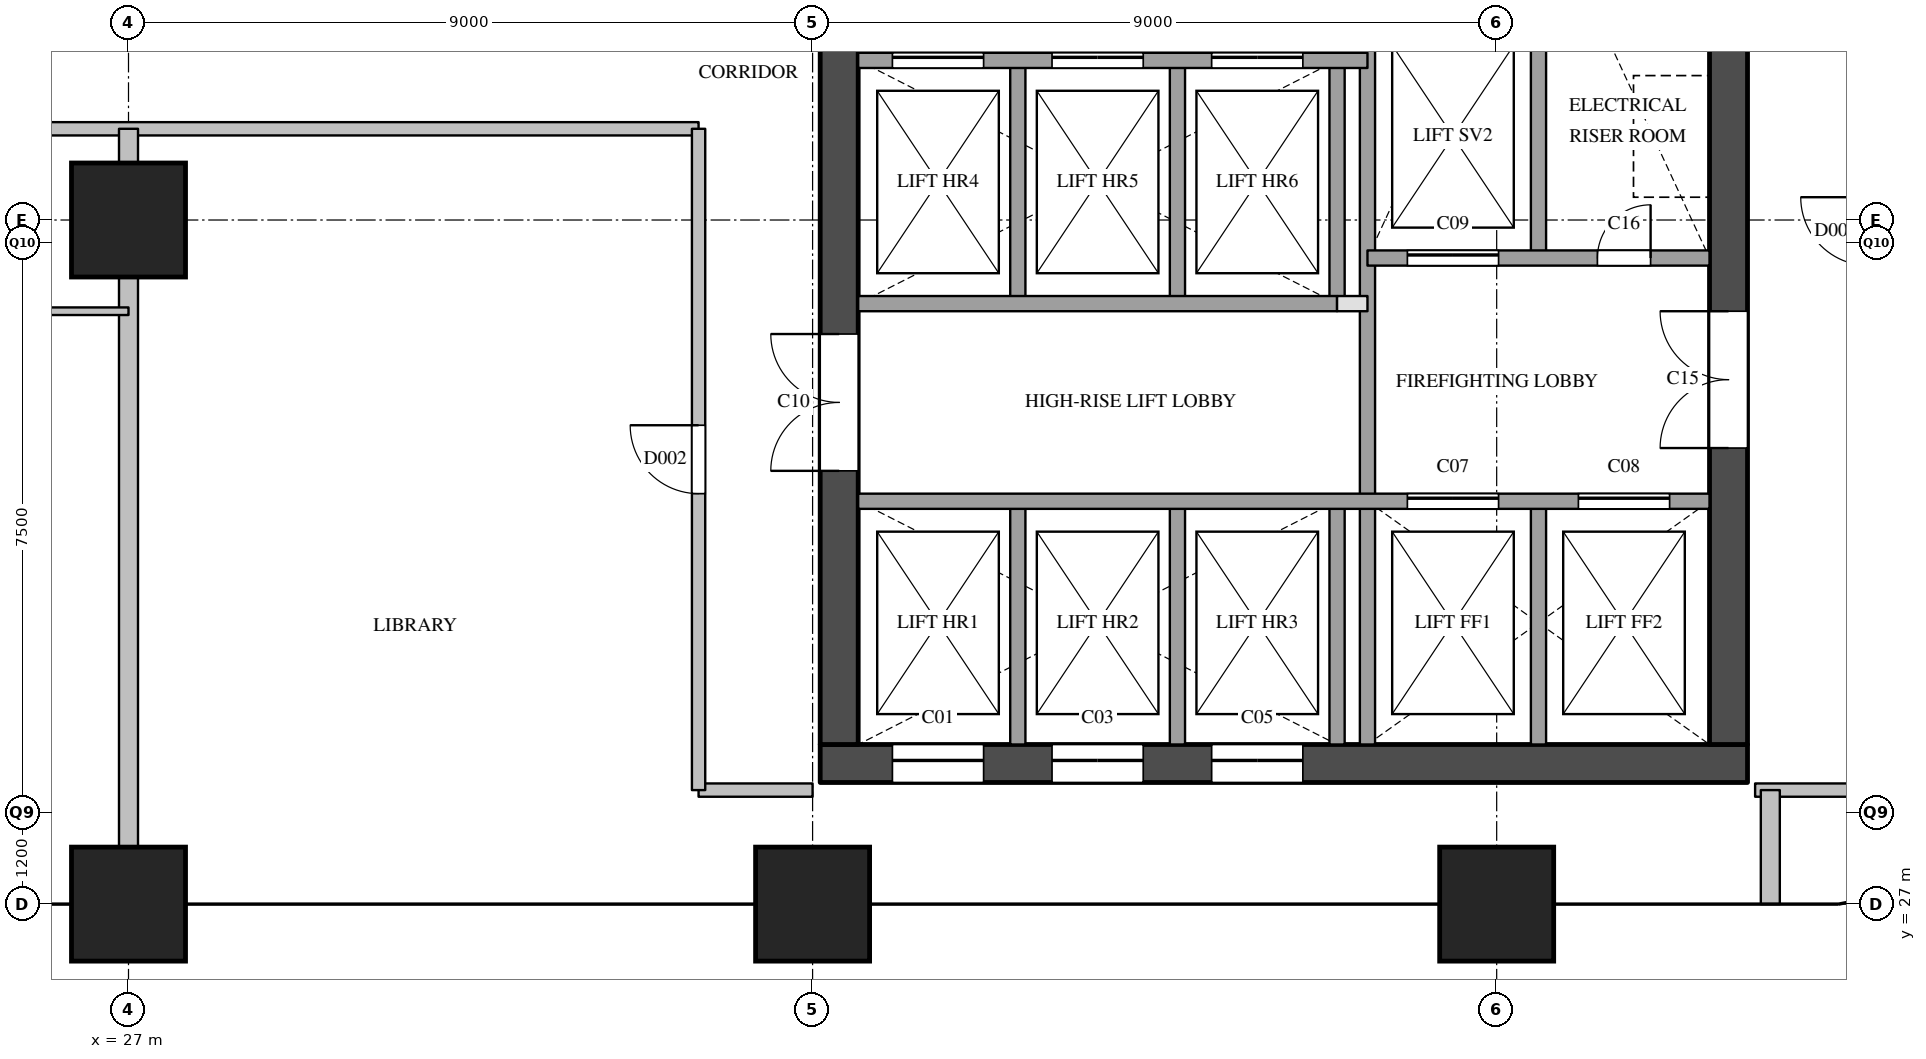
"""IFC4 building model, lengths in metres.
Left out: names, types, materials, properties, quantities, classifications, styles, units other than length and angle.
Written with IfcOpenShell. Run it as: python <this file> out.ifc"""

import sys

from ifc_helpers import new_model, si_unit, direction, frame, frame_2d, origin, origin_2d, place, context, subcontext, project, spatial, rectangle, extrude, element, fill, save


model = new_model("IFC4")
c1 = context("Model", 3, precision=1e-05, world=origin(), true_north=direction((0.0, 1.0)))
c2 = subcontext(c1, "Body", "Model", "MODEL_VIEW")
j1 = project(units=[si_unit("LENGTHUNIT", "METRE"), si_unit("PLANEANGLEUNIT", "RADIAN")], contexts=[c1])
p1 = place(None, origin())
s1 = spatial("IfcSite", under=j1, at=p1, CompositionType="ELEMENT")
p2 = place(p1, origin())
s2 = spatial("IfcBuilding", under=s1, at=p2, CompositionType="ELEMENT")
p3 = place(p2, frame((0.0, 0.0, 162.2)))
s3 = spatial("IfcBuildingStorey", under=s2, at=p3, CompositionType="ELEMENT", Elevation=162.2)
for number, where, z_axis, x_axis in (
    (1, (27.0, 27.0, 0.0), (0.0, 0.0, 1.0), (1.0, 0.0, 0.0)),
    (2, (27.0, 36.0, 0.0), (0.0, 0.0, 1.0), (1.0, 0.0, 0.0)),
    (3, (36.0, 27.0, 0.0), (0.0, 0.0, 1.0), (1.0, 0.0, 0.0)),
    (4, (45.0, 27.0, 0.0), (0.0, 0.0, 1.0), (1.0, 0.0, 0.0)),
):
    element("IfcColumn", number, at=place(p3, frame(where, z_axis=z_axis, x_axis=x_axis)), inside=s3, PredefinedType="COLUMN", context=c2, shape_type="SweptSolid", body=[
        extrude(rectangle(XDim=1.5, YDim=1.5, at=origin_2d()), origin(), (0.0, 0.0, 1.0), 3.9),
    ])
p4 = place(p3, frame((36.1, 28.85, 0.0), z_axis=(0.0, 0.0, 1.0), x_axis=(1.0, 0.0, 0.0)))
e5 = element("IfcWall", 5, at=p4, inside=s3, PredefinedType="SHEAR", context=c2, shape_type="SweptSolid", body=[
    extrude(rectangle(XDim=12.2, YDim=0.5, at=frame_2d((6.1, 0.0))), origin(), (0.0, 0.0, 1.0), 3.6),
])
p5 = place(p4, frame((0.95, 0.0, 0.0)))
e6 = element("IfcOpeningElement", 6, at=p5, cuts=e5, PredefinedType="OPENING", context=c2, shape_type="SweptSolid", body=[
    extrude(rectangle(XDim=1.2, YDim=2.1, at=frame_2d((0.6, 1.05))), frame((0.0, 0.26, 0.0), z_axis=(0.0, -1.0, 0.0), x_axis=(1.0, 0.0, 0.0)), (0.0, 0.0, 1.0), 0.52),
])
p6 = place(p4, frame((3.05, 0.0, 0.0)))
e7 = element("IfcOpeningElement", 7, at=p6, cuts=e5, PredefinedType="OPENING", context=c2, shape_type="SweptSolid", body=[
    extrude(rectangle(XDim=1.2, YDim=2.1, at=frame_2d((0.6, 1.05))), frame((0.0, 0.26, 0.0), z_axis=(0.0, -1.0, 0.0), x_axis=(1.0, 0.0, 0.0)), (0.0, 0.0, 1.0), 0.52),
])
p7 = place(p4, frame((5.15, 0.0, 0.0)))
e8 = element("IfcOpeningElement", 8, at=p7, cuts=e5, PredefinedType="OPENING", context=c2, shape_type="SweptSolid", body=[
    extrude(rectangle(XDim=1.2, YDim=2.1, at=frame_2d((0.6, 1.05))), frame((0.0, 0.26, 0.0), z_axis=(0.0, -1.0, 0.0), x_axis=(1.0, 0.0, 0.0)), (0.0, 0.0, 1.0), 0.52),
])
p8 = place(p3, frame((36.35, 29.1, 0.0), z_axis=(0.0, 0.0, 1.0), x_axis=(0.0, 1.0, 0.0)))
e9 = element("IfcWall", 9, at=p8, inside=s3, PredefinedType="SHEAR", context=c2, shape_type="SweptSolid", body=[
    extrude(rectangle(XDim=20.3, YDim=0.5, at=frame_2d((10.15, 0.0))), origin(), (0.0, 0.0, 1.0), 3.6),
])
p9 = place(p8, frame((3.6, 0.0, 0.0)))
e10 = element("IfcOpeningElement", 10, at=p9, cuts=e9, PredefinedType="OPENING", context=c2, shape_type="SweptSolid", body=[
    extrude(rectangle(XDim=1.8, YDim=2.1, at=frame_2d((0.9, 1.05))), frame((0.0, 0.26, 0.0), z_axis=(0.0, -1.0, 0.0), x_axis=(1.0, 0.0, 0.0)), (0.0, 0.0, 1.0), 0.52),
])
p10 = place(p8, frame((16.4, 0.0, 0.0)))
e11 = element("IfcOpeningElement", 11, at=p10, cuts=e9, PredefinedType="OPENING", context=c2, shape_type="SweptSolid", body=[
    extrude(rectangle(XDim=1.0, YDim=2.1, at=frame_2d((0.5, 1.05))), frame((0.0, 0.26, 0.0), z_axis=(0.0, -1.0, 0.0), x_axis=(1.0, 0.0, 0.0)), (0.0, 0.0, 1.0), 0.52),
])
p11 = place(p3, frame((48.05, 29.1, 0.0), z_axis=(0.0, 0.0, 1.0), x_axis=(0.0, 1.0, 0.0)))
e12 = element("IfcWall", 12, at=p11, inside=s3, PredefinedType="SHEAR", context=c2, shape_type="SweptSolid", body=[
    extrude(rectangle(XDim=20.3, YDim=0.5, at=frame_2d((10.15, 0.0))), origin(), (0.0, 0.0, 1.0), 3.6),
])
p12 = place(p11, frame((12.5, 0.0, 0.0)))
e13 = element("IfcOpeningElement", 13, at=p12, cuts=e12, PredefinedType="OPENING", context=c2, shape_type="SweptSolid", body=[
    extrude(rectangle(XDim=0.7, YDim=2.1, at=frame_2d((0.35, 1.05))), frame((0.0, 0.26, 0.0), z_axis=(0.0, -1.0, 0.0), x_axis=(1.0, 0.0, 0.0)), (0.0, 0.0, 1.0), 0.52),
])
p13 = place(p11, frame((3.9, 0.0, 0.0)))
e14 = element("IfcOpeningElement", 14, at=p13, cuts=e12, PredefinedType="OPENING", context=c2, shape_type="SweptSolid", body=[
    extrude(rectangle(XDim=1.8, YDim=2.1, at=frame_2d((0.9, 1.05))), frame((0.0, 0.26, 0.0), z_axis=(0.0, -1.0, 0.0), x_axis=(1.0, 0.0, 0.0)), (0.0, 0.0, 1.0), 0.52),
])
p14 = place(p3, frame((38.7, 29.1, 0.0), z_axis=(0.0, 0.0, 1.0), x_axis=(0.0, 1.0, 0.0)))
e15 = element("IfcWall", 15, at=p14, inside=s3, PredefinedType="SOLIDWALL", context=c2, shape_type="SweptSolid", body=[
    extrude(rectangle(XDim=3.2, YDim=0.2, at=frame_2d((1.6, 0.0))), origin(), (0.0, 0.0, 1.0), 3.6),
])
p15 = place(p3, frame((38.7, 34.9, 0.0), z_axis=(0.0, 0.0, 1.0), x_axis=(0.0, 1.0, 0.0)))
e16 = element("IfcWall", 16, at=p15, inside=s3, PredefinedType="SOLIDWALL", context=c2, shape_type="SweptSolid", body=[
    extrude(rectangle(XDim=3.2, YDim=0.2, at=frame_2d((1.6, 0.0))), origin(), (0.0, 0.0, 1.0), 3.6),
])
p16 = place(p3, frame((40.8, 29.1, 0.0), z_axis=(0.0, 0.0, 1.0), x_axis=(0.0, 1.0, 0.0)))
e17 = element("IfcWall", 17, at=p16, inside=s3, PredefinedType="SOLIDWALL", context=c2, shape_type="SweptSolid", body=[
    extrude(rectangle(XDim=3.2, YDim=0.2, at=frame_2d((1.6, 0.0))), origin(), (0.0, 0.0, 1.0), 3.6),
])
p17 = place(p3, frame((40.8, 34.9, 0.0), z_axis=(0.0, 0.0, 1.0), x_axis=(0.0, 1.0, 0.0)))
e18 = element("IfcWall", 18, at=p17, inside=s3, PredefinedType="SOLIDWALL", context=c2, shape_type="SweptSolid", body=[
    extrude(rectangle(XDim=3.2, YDim=0.2, at=frame_2d((1.6, 0.0))), origin(), (0.0, 0.0, 1.0), 3.6),
])
p18 = place(p3, frame((42.9, 29.1, 0.0), z_axis=(0.0, 0.0, 1.0), x_axis=(0.0, 1.0, 0.0)))
e19 = element("IfcWall", 19, at=p18, inside=s3, PredefinedType="SOLIDWALL", context=c2, shape_type="SweptSolid", body=[
    extrude(rectangle(XDim=3.2, YDim=0.2, at=frame_2d((1.6, 0.0))), origin(), (0.0, 0.0, 1.0), 3.6),
])
p19 = place(p3, frame((42.9, 34.9, 0.0), z_axis=(0.0, 0.0, 1.0), x_axis=(0.0, 1.0, 0.0)))
e20 = element("IfcWall", 20, at=p19, inside=s3, PredefinedType="SOLIDWALL", context=c2, shape_type="SweptSolid", body=[
    extrude(rectangle(XDim=3.2, YDim=0.2, at=frame_2d((1.6, 0.0))), origin(), (0.0, 0.0, 1.0), 3.6),
])
p20 = place(p3, frame((43.3, 29.1, 0.0), z_axis=(0.0, 0.0, 1.0), x_axis=(0.0, 1.0, 0.0)))
e21 = element("IfcWall", 21, at=p20, inside=s3, PredefinedType="SOLIDWALL", context=c2, shape_type="SweptSolid", body=[
    extrude(rectangle(XDim=9.9, YDim=0.2, at=frame_2d((4.95, 0.0))), origin(), (0.0, 0.0, 1.0), 3.6),
])
for number, where, z_axis, x_axis in (
    (22, (45.55, 29.1, 0.0), (0.0, 0.0, 1.0), (0.0, 1.0, 0.0)),
    (23, (45.55, 35.5, 0.0), (0.0, 0.0, 1.0), (0.0, 1.0, 0.0)),
):
    element("IfcWall", number, at=place(p3, frame(where, z_axis=z_axis, x_axis=x_axis)), inside=s3, PredefinedType="SOLIDWALL", context=c2, shape_type="SweptSolid", body=[
        extrude(rectangle(XDim=3.2, YDim=0.2, at=frame_2d((1.6, 0.0))), origin(), (0.0, 0.0, 1.0), 3.6),
    ])
p21 = place(p3, frame((36.6, 32.3, 0.0), z_axis=(0.0, 0.0, 1.0), x_axis=(1.0, 0.0, 0.0)))
e24 = element("IfcWall", 24, at=p21, inside=s3, PredefinedType="SOLIDWALL", context=c2, shape_type="SweptSolid", body=[
    extrude(rectangle(XDim=11.2, YDim=0.2, at=frame_2d((5.6, 0.0))), origin(), (0.0, 0.0, 1.0), 3.6),
])
p22 = place(p21, frame((7.225, 0.0, 0.0)))
e25 = element("IfcOpeningElement", 25, at=p22, cuts=e24, PredefinedType="OPENING", context=c2, shape_type="SweptSolid", body=[
    extrude(rectangle(XDim=1.2, YDim=2.1, at=frame_2d((0.6, 1.05))), frame((0.0, 0.11, 0.0), z_axis=(0.0, -1.0, 0.0), x_axis=(1.0, 0.0, 0.0)), (0.0, 0.0, 1.0), 0.22),
])
p23 = place(p21, frame((9.475, 0.0, 0.0)))
e26 = element("IfcOpeningElement", 26, at=p23, cuts=e24, PredefinedType="OPENING", context=c2, shape_type="SweptSolid", body=[
    extrude(rectangle(XDim=1.2, YDim=2.1, at=frame_2d((0.6, 1.05))), frame((0.0, 0.11, 0.0), z_axis=(0.0, -1.0, 0.0), x_axis=(1.0, 0.0, 0.0)), (0.0, 0.0, 1.0), 0.22),
])
p24 = place(p3, frame((42.9, 34.9, 0.0), z_axis=(0.0, 0.0, 1.0), x_axis=(1.0, 0.0, 0.0)))
e27 = element("IfcWall", 27, at=p24, inside=s3, PredefinedType="PARTITIONING", context=c2, shape_type="SweptSolid", body=[
    extrude(rectangle(XDim=0.4, YDim=0.2, at=frame_2d((0.2, 0.0))), origin(), (0.0, 0.0, 1.0), 3.6),
])
p25 = place(p3, frame((36.6, 34.9, 0.0), z_axis=(0.0, 0.0, 1.0), x_axis=(1.0, 0.0, 0.0)))
e28 = element("IfcWall", 28, at=p25, inside=s3, PredefinedType="SOLIDWALL", context=c2, shape_type="SweptSolid", body=[
    extrude(rectangle(XDim=6.3, YDim=0.2, at=frame_2d((3.15, 0.0))), origin(), (0.0, 0.0, 1.0), 3.6),
])
p26 = place(p3, frame((43.3, 35.5, 0.0), z_axis=(0.0, 0.0, 1.0), x_axis=(1.0, 0.0, 0.0)))
e29 = element("IfcWall", 29, at=p26, inside=s3, PredefinedType="SOLIDWALL", context=c2, shape_type="SweptSolid", body=[
    extrude(rectangle(XDim=4.5, YDim=0.2, at=frame_2d((2.25, 0.0))), origin(), (0.0, 0.0, 1.0), 3.6),
])
p27 = place(p26, frame((0.525, 0.0, 0.0)))
e30 = element("IfcOpeningElement", 30, at=p27, cuts=e29, PredefinedType="OPENING", context=c2, shape_type="SweptSolid", body=[
    extrude(rectangle(XDim=1.2, YDim=2.1, at=frame_2d((0.6, 1.05))), frame((0.0, 0.11, 0.0), z_axis=(0.0, -1.0, 0.0), x_axis=(1.0, 0.0, 0.0)), (0.0, 0.0, 1.0), 0.22),
])
p28 = place(p26, frame((3.025, 0.0, 0.0)))
e31 = element("IfcOpeningElement", 31, at=p28, cuts=e29, PredefinedType="OPENING", context=c2, shape_type="SweptSolid", body=[
    extrude(rectangle(XDim=0.7, YDim=2.1, at=frame_2d((0.35, 1.05))), frame((0.0, 0.11, 0.0), z_axis=(0.0, -1.0, 0.0), x_axis=(1.0, 0.0, 0.0)), (0.0, 0.0, 1.0), 0.22),
])
p29 = place(p3, frame((36.6, 38.1, 0.0), z_axis=(0.0, 0.0, 1.0), x_axis=(1.0, 0.0, 0.0)))
e32 = element("IfcWall", 32, at=p29, inside=s3, PredefinedType="SOLIDWALL", context=c2, shape_type="SweptSolid", body=[
    extrude(rectangle(XDim=6.7, YDim=0.2, at=frame_2d((3.35, 0.0))), origin(), (0.0, 0.0, 1.0), 3.6),
])
p30 = place(p29, frame((0.45, 0.0, 0.0)))
e33 = element("IfcOpeningElement", 33, at=p30, cuts=e32, PredefinedType="OPENING", context=c2, shape_type="SweptSolid", body=[
    extrude(rectangle(XDim=1.2, YDim=2.1, at=frame_2d((0.6, 1.05))), frame((0.0, 0.11, 0.0), z_axis=(0.0, -1.0, 0.0), x_axis=(1.0, 0.0, 0.0)), (0.0, 0.0, 1.0), 0.22),
])
p31 = place(p29, frame((2.55, 0.0, 0.0)))
e34 = element("IfcOpeningElement", 34, at=p31, cuts=e32, PredefinedType="OPENING", context=c2, shape_type="SweptSolid", body=[
    extrude(rectangle(XDim=1.2, YDim=2.1, at=frame_2d((0.6, 1.05))), frame((0.0, 0.11, 0.0), z_axis=(0.0, -1.0, 0.0), x_axis=(1.0, 0.0, 0.0)), (0.0, 0.0, 1.0), 0.22),
])
p32 = place(p29, frame((4.65, 0.0, 0.0)))
e35 = element("IfcOpeningElement", 35, at=p32, cuts=e32, PredefinedType="OPENING", context=c2, shape_type="SweptSolid", body=[
    extrude(rectangle(XDim=1.2, YDim=2.1, at=frame_2d((0.6, 1.05))), frame((0.0, 0.11, 0.0), z_axis=(0.0, -1.0, 0.0), x_axis=(1.0, 0.0, 0.0)), (0.0, 0.0, 1.0), 0.22),
])
for number, where, z_axis, x_axis in (
    (36, (34.5, 28.5, 0.0), (0.0, 0.0, 1.0), (1.0, 0.0, 0.0)),
    (37, (48.4, 28.5, 0.0), (0.0, 0.0, 1.0), (1.0, 0.0, 0.0)),
):
    element("IfcWall", number, at=place(p3, frame(where, z_axis=z_axis, x_axis=x_axis)), inside=s3, PredefinedType="PARTITIONING", context=c2, shape_type="SweptSolid", body=[
        extrude(rectangle(XDim=1.5, YDim=0.175, at=frame_2d((0.75, 0.0))), origin(), (0.0, 0.0, 1.0), 3.6),
    ])
p33 = place(p3, frame((19.5, 37.2, 0.0), z_axis=(0.0, 0.0, 1.0), x_axis=(1.0, 0.0, 0.0)))
e38 = element("IfcWall", 38, at=p33, inside=s3, PredefinedType="PARTITIONING", context=c2, shape_type="SweptSolid", body=[
    extrude(rectangle(XDim=15.0, YDim=0.175, at=frame_2d((7.5, 0.0))), origin(), (0.0, 0.0, 1.0), 2.6),
])
p34 = place(p33, frame((2.5, 0.0, 0.0)))
e39 = element("IfcOpeningElement", 39, at=p34, cuts=e38, PredefinedType="OPENING", context=c2, shape_type="SweptSolid", body=[
    extrude(rectangle(XDim=1.0, YDim=2.1, at=frame_2d((0.5, 1.05))), frame((0.0, 0.097, 0.0), z_axis=(0.0, -1.0, 0.0), x_axis=(1.0, 0.0, 0.0)), (0.0, 0.0, 1.0), 0.195),
])
p35 = place(p3, frame((34.5, 28.5, 0.0), z_axis=(0.0, 0.0, 1.0), x_axis=(0.0, 1.0, 0.0)))
e40 = element("IfcWall", 40, at=p35, inside=s3, PredefinedType="PARTITIONING", context=c2, shape_type="SweptSolid", body=[
    extrude(rectangle(XDim=8.7, YDim=0.175, at=frame_2d((4.35, 0.0))), origin(), (0.0, 0.0, 1.0), 3.6),
])
p36 = place(p35, frame((3.9, 0.0, 0.0)))
e41 = element("IfcOpeningElement", 41, at=p36, cuts=e40, PredefinedType="OPENING", context=c2, shape_type="SweptSolid", body=[
    extrude(rectangle(XDim=0.9, YDim=2.1, at=frame_2d((0.45, 1.05))), frame((0.0, 0.097, 0.0), z_axis=(0.0, -1.0, 0.0), x_axis=(1.0, 0.0, 0.0)), (0.0, 0.0, 1.0), 0.195),
])
p37 = place(p3, frame((27.0, 27.0, 0.0), z_axis=(0.0, 0.0, 1.0), x_axis=(0.0, 1.0, 0.0)))
e42 = element("IfcWall", 42, at=p37, inside=s3, PredefinedType="PARTITIONING", context=c2, shape_type="SweptSolid", body=[
    extrude(rectangle(XDim=10.2, YDim=0.25, at=frame_2d((5.1, 0.0))), origin(), (0.0, 0.0, 1.0), 2.6),
])
p38 = place(p3, frame((48.6, 27.0, 0.0), z_axis=(0.0, 0.0, 1.0), x_axis=(0.0, 1.0, 0.0)))
e43 = element("IfcWall", 43, at=p38, inside=s3, PredefinedType="PARTITIONING", context=c2, shape_type="SweptSolid", body=[
    extrude(rectangle(XDim=1.5, YDim=0.25, at=frame_2d((0.75, 0.0))), origin(), (0.0, 0.0, 1.0), 2.6),
])
p39 = place(p3, frame((23.4, 34.8, 0.0), z_axis=(0.0, 0.0, 1.0), x_axis=(1.0, 0.0, 0.0)))
e44 = element("IfcWall", 44, at=p39, inside=s3, PredefinedType="PARTITIONING", context=c2, shape_type="SweptSolid", body=[
    extrude(rectangle(XDim=3.6, YDim=0.1, at=frame_2d((1.8, 0.0))), origin(), (0.0, 0.0, 1.0), 2.6),
])
p40 = place(p39, frame((1.4, 0.0, 0.0)))
e45 = element("IfcOpeningElement", 45, at=p40, cuts=e44, PredefinedType="OPENING", context=c2, shape_type="SweptSolid", body=[
    extrude(rectangle(XDim=0.8, YDim=2.1, at=frame_2d((0.4, 1.05))), frame((0.0, 0.06, 0.0), z_axis=(0.0, -1.0, 0.0), x_axis=(1.0, 0.0, 0.0)), (0.0, 0.0, 1.0), 0.12),
])
p41 = place(p5, origin())
e46 = element("IfcDoor", 46, at=p41, inside=s3, OperationType="SLIDING_TO_LEFT", PredefinedType="DOOR", context=c2, shape_type="SweptSolid", body=[
    extrude(rectangle(XDim=1.2, YDim=2.1, at=frame_2d((0.6, 1.05))), frame((0.0, 0.025, 0.0), z_axis=(0.0, -1.0, 0.0), x_axis=(1.0, 0.0, 0.0)), (0.0, 0.0, 1.0), 0.05),
])
fill(e6, e46)
p42 = place(p30, origin())
e47 = element("IfcDoor", 47, at=p42, inside=s3, OperationType="SLIDING_TO_LEFT", PredefinedType="DOOR", context=c2, shape_type="SweptSolid", body=[
    extrude(rectangle(XDim=1.2, YDim=2.1, at=frame_2d((0.6, 1.05))), frame((0.0, 0.025, 0.0), z_axis=(0.0, -1.0, 0.0), x_axis=(1.0, 0.0, 0.0)), (0.0, 0.0, 1.0), 0.05),
])
fill(e33, e47)
p43 = place(p6, origin())
e48 = element("IfcDoor", 48, at=p43, inside=s3, OperationType="SLIDING_TO_LEFT", PredefinedType="DOOR", context=c2, shape_type="SweptSolid", body=[
    extrude(rectangle(XDim=1.2, YDim=2.1, at=frame_2d((0.6, 1.05))), frame((0.0, 0.025, 0.0), z_axis=(0.0, -1.0, 0.0), x_axis=(1.0, 0.0, 0.0)), (0.0, 0.0, 1.0), 0.05),
])
fill(e7, e48)
p44 = place(p31, origin())
e49 = element("IfcDoor", 49, at=p44, inside=s3, OperationType="SLIDING_TO_LEFT", PredefinedType="DOOR", context=c2, shape_type="SweptSolid", body=[
    extrude(rectangle(XDim=1.2, YDim=2.1, at=frame_2d((0.6, 1.05))), frame((0.0, 0.025, 0.0), z_axis=(0.0, -1.0, 0.0), x_axis=(1.0, 0.0, 0.0)), (0.0, 0.0, 1.0), 0.05),
])
fill(e34, e49)
p45 = place(p7, origin())
e50 = element("IfcDoor", 50, at=p45, inside=s3, OperationType="SLIDING_TO_LEFT", PredefinedType="DOOR", context=c2, shape_type="SweptSolid", body=[
    extrude(rectangle(XDim=1.2, YDim=2.1, at=frame_2d((0.6, 1.05))), frame((0.0, 0.025, 0.0), z_axis=(0.0, -1.0, 0.0), x_axis=(1.0, 0.0, 0.0)), (0.0, 0.0, 1.0), 0.05),
])
fill(e8, e50)
p46 = place(p32, origin())
e51 = element("IfcDoor", 51, at=p46, inside=s3, OperationType="SLIDING_TO_LEFT", PredefinedType="DOOR", context=c2, shape_type="SweptSolid", body=[
    extrude(rectangle(XDim=1.2, YDim=2.1, at=frame_2d((0.6, 1.05))), frame((0.0, 0.025, 0.0), z_axis=(0.0, -1.0, 0.0), x_axis=(1.0, 0.0, 0.0)), (0.0, 0.0, 1.0), 0.05),
])
fill(e35, e51)
p47 = place(p22, origin())
e52 = element("IfcDoor", 52, at=p47, inside=s3, OperationType="SLIDING_TO_LEFT", PredefinedType="DOOR", context=c2, shape_type="SweptSolid", body=[
    extrude(rectangle(XDim=1.2, YDim=2.1, at=frame_2d((0.6, 1.05))), frame((0.0, 0.025, 0.0), z_axis=(0.0, -1.0, 0.0), x_axis=(1.0, 0.0, 0.0)), (0.0, 0.0, 1.0), 0.05),
])
fill(e25, e52)
p48 = place(p23, origin())
e53 = element("IfcDoor", 53, at=p48, inside=s3, OperationType="SLIDING_TO_LEFT", PredefinedType="DOOR", context=c2, shape_type="SweptSolid", body=[
    extrude(rectangle(XDim=1.2, YDim=2.1, at=frame_2d((0.6, 1.05))), frame((0.0, 0.025, 0.0), z_axis=(0.0, -1.0, 0.0), x_axis=(1.0, 0.0, 0.0)), (0.0, 0.0, 1.0), 0.05),
])
fill(e26, e53)
p49 = place(p27, origin())
e54 = element("IfcDoor", 54, at=p49, inside=s3, OperationType="SLIDING_TO_LEFT", PredefinedType="DOOR", context=c2, shape_type="SweptSolid", body=[
    extrude(rectangle(XDim=1.2, YDim=2.1, at=frame_2d((0.6, 1.05))), frame((0.0, 0.025, 0.0), z_axis=(0.0, -1.0, 0.0), x_axis=(1.0, 0.0, 0.0)), (0.0, 0.0, 1.0), 0.05),
])
fill(e30, e54)
p50 = place(p9, origin())
e55 = element("IfcDoor", 55, at=p50, inside=s3, OperationType="DOUBLE_DOOR_SINGLE_SWING", PredefinedType="DOOR", context=c2, shape_type="SweptSolid", body=[
    extrude(rectangle(XDim=1.8, YDim=2.1, at=frame_2d((0.9, 1.05))), frame((0.0, 0.025, 0.0), z_axis=(0.0, -1.0, 0.0), x_axis=(1.0, 0.0, 0.0)), (0.0, 0.0, 1.0), 0.05),
])
fill(e10, e55)
p51 = place(p13, origin())
e56 = element("IfcDoor", 56, at=p51, inside=s3, OperationType="DOUBLE_DOOR_SINGLE_SWING", PredefinedType="DOOR", context=c2, shape_type="SweptSolid", body=[
    extrude(rectangle(XDim=1.8, YDim=2.1, at=frame_2d((0.9, 1.05))), frame((0.0, 0.025, 0.0), z_axis=(0.0, -1.0, 0.0), x_axis=(1.0, 0.0, 0.0)), (0.0, 0.0, 1.0), 0.05),
])
fill(e14, e56)
p52 = place(p28, origin())
e57 = element("IfcDoor", 57, at=p52, inside=s3, OperationType="SINGLE_SWING_RIGHT", PredefinedType="DOOR", context=c2, shape_type="SweptSolid", body=[
    extrude(rectangle(XDim=0.7, YDim=2.1, at=frame_2d((0.35, 1.05))), frame((0.0, 0.025, 0.0), z_axis=(0.0, -1.0, 0.0), x_axis=(1.0, 0.0, 0.0)), (0.0, 0.0, 1.0), 0.05),
])
fill(e31, e57)
p53 = place(p36, origin())
e58 = element("IfcDoor", 58, at=p53, inside=s3, OperationType="SINGLE_SWING_RIGHT", PredefinedType="DOOR", context=c2, shape_type="SweptSolid", body=[
    extrude(rectangle(XDim=0.9, YDim=2.1, at=frame_2d((0.45, 1.05))), frame((0.0, 0.025, 0.0), z_axis=(0.0, -1.0, 0.0), x_axis=(1.0, 0.0, 0.0)), (0.0, 0.0, 1.0), 0.05),
])
fill(e41, e58)
save(model, sys.argv[1])
